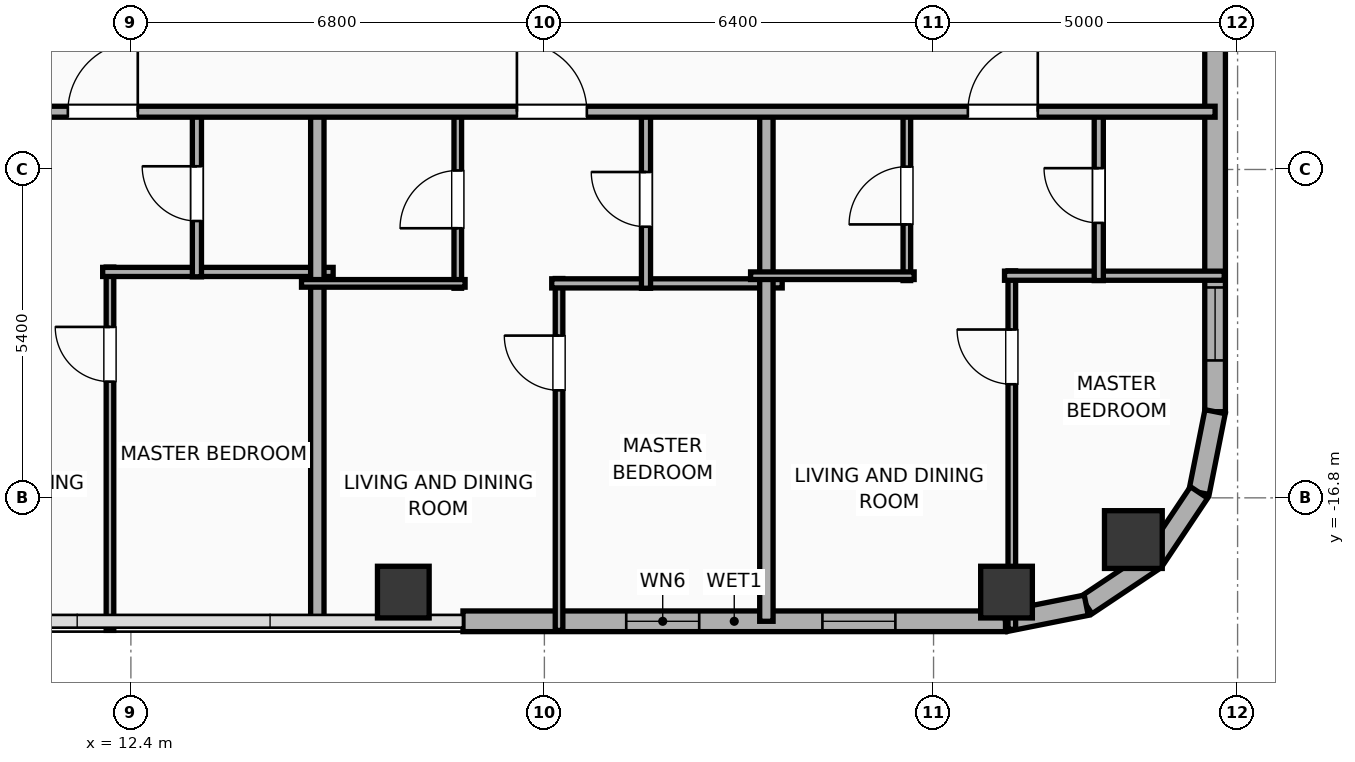
"""IFC4 building model, lengths in metres.
Left out: names, types, materials, properties, quantities, classifications, styles, units other than length and angle.
Written with IfcOpenShell. Run it as: python <this file> out.ifc"""

import sys

from ifc_helpers import new_model, si_unit, direction, frame, frame_2d, origin, origin_2d, place, context, subcontext, project, spatial, rectangle, hollow_rectangle, hollow_circle, extrude, element, fill, save


model = new_model("IFC4")
c1 = context("Model", 3, precision=1e-05, world=origin(), true_north=direction((0.0, 1.0)))
c2 = subcontext(c1, "Body", "Model", "MODEL_VIEW")
j1 = project(units=[si_unit("LENGTHUNIT", "METRE"), si_unit("PLANEANGLEUNIT", "RADIAN")], contexts=[c1])
p1 = place(None, origin())
s1 = spatial("IfcSite", under=j1, at=p1, CompositionType="ELEMENT")
p2 = place(p1, origin())
s2 = spatial("IfcBuilding", under=s1, at=p2, CompositionType="ELEMENT")
p3 = place(p2, frame((0.0, 0.0, 204.1)))
s3 = spatial("IfcBuildingStorey", under=s2, at=p3, CompositionType="ELEMENT", Elevation=204.1)
for number, where, z_axis, x_axis in (
    (1, (16.88, -18.35, 0.0), (0.0, 0.0, 1.0), (1.0, 0.0, 0.0)),
    (2, (26.8, -18.35, 0.0), (0.0, 0.0, 1.0), (1.0, 0.0, 0.0)),
):
    element("IfcColumn", number, at=place(p3, frame(where, z_axis=z_axis, x_axis=x_axis)), inside=s3, PredefinedType="COLUMN", context=c2, shape_type="SweptSolid", body=[
        extrude(hollow_rectangle(XDim=0.85, YDim=0.85, WallThickness=0.028, at=origin_2d()), origin(), (0.0, 0.0, 1.0), 3.9),
    ])
p4 = place(p3, frame((28.886, -17.486, 0.0), z_axis=(0.0, 0.0, 1.0), x_axis=(1.0, 0.0, 0.0)))
e3 = element("IfcColumn", 3, at=p4, inside=s3, PredefinedType="COLUMN", context=c2, shape_type="SweptSolid", body=[
    extrude(hollow_circle(Radius=0.475, WallThickness=0.032, at=origin_2d()), origin(), (0.0, 0.0, 1.0), 3.9),
])
p5 = place(p3, frame((26.783, -18.83, 0.0), z_axis=(0.0, 0.0, 1.0), x_axis=(-1.0, 0.0, 0.0)))
e4 = element("IfcWall", 4, at=p5, inside=s3, PredefinedType="ELEMENTEDWALL", context=c2, shape_type="SweptSolid", body=[
    extrude(rectangle(XDim=8.922, YDim=0.34, at=frame_2d((4.461, 0.0))), origin(), (0.0, 0.0, 1.0), 3.65),
])
p6 = place(p5, frame((5.037, 0.0, 0.75)))
e5 = element("IfcOpeningElement", 5, at=p6, cuts=e4, PredefinedType="OPENING", context=c2, shape_type="SweptSolid", body=[
    extrude(rectangle(XDim=1.2, YDim=2.05, at=frame_2d((0.6, 1.025))), frame((0.0, 0.18, 0.0), z_axis=(0.0, -1.0, 0.0), x_axis=(1.0, 0.0, 0.0)), (0.0, 0.0, 1.0), 0.36),
])
p7 = place(p5, frame((1.811, 0.0, 0.75)))
e6 = element("IfcOpeningElement", 6, at=p7, cuts=e4, PredefinedType="OPENING", context=c2, shape_type="SweptSolid", body=[
    extrude(rectangle(XDim=1.2, YDim=2.05, at=frame_2d((0.6, 1.025))), frame((0.0, 0.18, 0.0), z_axis=(0.0, -1.0, 0.0), x_axis=(1.0, 0.0, 0.0)), (0.0, 0.0, 1.0), 0.36),
])
p8 = place(p3, frame((30.23, 16.583, 0.0), z_axis=(0.0, 0.0, 1.0), x_axis=(0.0, -1.0, 0.0)))
e7 = element("IfcWall", 7, at=p8, inside=s3, PredefinedType="ELEMENTEDWALL", context=c2, shape_type="SweptSolid", body=[
    extrude(rectangle(XDim=31.967, YDim=0.34, at=frame_2d((15.983, 0.0))), origin(), (0.0, 0.0, 1.0), 3.65),
])
p9 = place(p8, frame((29.924, 0.0, 0.75)))
e8 = element("IfcOpeningElement", 8, at=p9, cuts=e7, PredefinedType="OPENING", context=c2, shape_type="SweptSolid", body=[
    extrude(rectangle(XDim=1.2, YDim=2.05, at=frame_2d((0.6, 1.025))), frame((0.0, 0.18, 0.0), z_axis=(0.0, -1.0, 0.0), x_axis=(1.0, 0.0, 0.0)), (0.0, 0.0, 1.0), 0.36),
])
p10 = place(p8, frame((11.463, 0.0, 0.75)))
e9 = element("IfcOpeningElement", 9, at=p10, cuts=e7, PredefinedType="OPENING", context=c2, shape_type="SweptSolid", body=[
    extrude(rectangle(XDim=1.2, YDim=2.05, at=frame_2d((0.6, 1.025))), frame((0.0, 0.18, 0.0), z_axis=(0.0, -1.0, 0.0), x_axis=(1.0, 0.0, 0.0)), (0.0, 0.0, 1.0), 0.36),
])
p11 = place(p8, frame((20.363, 0.0, 0.75)))
e10 = element("IfcOpeningElement", 10, at=p11, cuts=e7, PredefinedType="OPENING", context=c2, shape_type="SweptSolid", body=[
    extrude(rectangle(XDim=1.2, YDim=2.05, at=frame_2d((0.6, 1.025))), frame((0.0, 0.18, 0.0), z_axis=(0.0, -1.0, 0.0), x_axis=(1.0, 0.0, 0.0)), (0.0, 0.0, 1.0), 0.36),
])
p12 = place(p3, frame((30.23, -15.383, 0.0), z_axis=(0.0, 0.0, 1.0), x_axis=(-0.195110379894, -0.98078129043, 0.0)))
e11 = element("IfcWall", 11, at=p12, inside=s3, PredefinedType="ELEMENTEDWALL", context=c2, shape_type="SweptSolid", body=[
    extrude(rectangle(XDim=1.354, YDim=0.34, at=frame_2d((0.677, 0.0))), origin(), (0.0, 0.0, 1.0), 3.65),
])
p13 = place(p3, frame((29.966, -16.711, 0.0), z_axis=(0.0, 0.0, 1.0), x_axis=(-0.555584683399, -0.831459956686, 0.0)))
e12 = element("IfcWall", 12, at=p13, inside=s3, PredefinedType="ELEMENTEDWALL", context=c2, shape_type="SweptSolid", body=[
    extrude(rectangle(XDim=1.337, YDim=0.34, at=frame_2d((0.668, 0.0))), origin(), (0.0, 0.0, 1.0), 3.65),
])
p14 = place(p3, frame((29.223, -17.823, 0.0), z_axis=(0.0, 0.0, 1.0), x_axis=(-0.831403586725, -0.555669034571, 0.0)))
e13 = element("IfcWall", 13, at=p14, inside=s3, PredefinedType="ELEMENTEDWALL", context=c2, shape_type="SweptSolid", body=[
    extrude(rectangle(XDim=1.337, YDim=0.34, at=frame_2d((0.668, 0.0))), origin(), (0.0, 0.0, 1.0), 3.65),
])
p15 = place(p3, frame((28.111, -18.566, 0.0), z_axis=(0.0, 0.0, 1.0), x_axis=(-0.980788153188, -0.195075878998, 0.0)))
e14 = element("IfcWall", 14, at=p15, inside=s3, PredefinedType="ELEMENTEDWALL", context=c2, shape_type="SweptSolid", body=[
    extrude(rectangle(XDim=1.354, YDim=0.34, at=frame_2d((0.677, 0.0))), origin(), (0.0, 0.0, 1.0), 3.65),
])
p16 = place(p3, frame((12.056, -18.98, 0.0), z_axis=(0.0, 0.0, 1.0), x_axis=(0.0, 1.0, 0.0)))
e15 = element("IfcWall", 15, at=p16, inside=s3, PredefinedType="PARTITIONING", context=c2, shape_type="SweptSolid", body=[
    extrude(rectangle(XDim=5.975, YDim=0.125, at=frame_2d((2.988, 0.0))), origin(), (0.0, 0.0, 1.0), 3.65),
])
p17 = place(p16, frame((4.091, 0.0, 0.0)))
e16 = element("IfcOpeningElement", 16, at=p17, cuts=e15, PredefinedType="OPENING", context=c2, shape_type="SweptSolid", body=[
    extrude(rectangle(XDim=0.9, YDim=2.05, at=frame_2d((0.45, 1.025))), frame((0.0, 0.073, 0.0), z_axis=(0.0, -1.0, 0.0), x_axis=(1.0, 0.0, 0.0)), (0.0, 0.0, 1.0), 0.145),
])
p18 = place(p3, frame((11.936, -13.085, 0.0), z_axis=(0.0, 0.0, 1.0), x_axis=(1.0, 0.0, 0.0)))
e17 = element("IfcWall", 17, at=p18, inside=s3, PredefinedType="PLUMBINGWALL", context=c2, shape_type="SweptSolid", body=[
    extrude(rectangle(XDim=3.79, YDim=0.15, at=frame_2d((1.895, 0.0))), origin(), (0.0, 0.0, 1.0), 3.65),
])
p19 = place(p3, frame((13.486, -13.165, 0.0), z_axis=(0.0, 0.0, 1.0), x_axis=(0.0, 1.0, 0.0)))
e18 = element("IfcWall", 18, at=p19, inside=s3, PredefinedType="PLUMBINGWALL", context=c2, shape_type="SweptSolid", body=[
    extrude(rectangle(XDim=2.735, YDim=0.15, at=frame_2d((1.368, 0.0))), origin(), (0.0, 0.0, 1.0), 3.65),
])
p20 = place(p19, frame((0.917, 0.0, 0.0)))
e19 = element("IfcOpeningElement", 19, at=p20, cuts=e18, PredefinedType="OPENING", context=c2, shape_type="SweptSolid", body=[
    extrude(rectangle(XDim=0.9, YDim=2.05, at=frame_2d((0.45, 1.025))), frame((0.0, 0.085, 0.0), z_axis=(0.0, -1.0, 0.0), x_axis=(1.0, 0.0, 0.0)), (0.0, 0.0, 1.0), 0.17),
])
p21 = place(p3, frame((15.466, -18.83, 0.0), z_axis=(0.0, 0.0, 1.0), x_axis=(0.0, 1.0, 0.0)))
e20 = element("IfcWall", 20, at=p21, inside=s3, PredefinedType="PARTITIONING", context=c2, shape_type="SweptSolid", body=[
    extrude(rectangle(XDim=8.46, YDim=0.22, at=frame_2d((4.23, 0.0))), origin(), (0.0, 0.0, 1.0), 3.65),
])
p22 = place(p3, frame((19.441, -18.98, 0.0), z_axis=(0.0, 0.0, 1.0), x_axis=(0.0, 1.0, 0.0)))
e21 = element("IfcWall", 21, at=p22, inside=s3, PredefinedType="PARTITIONING", context=c2, shape_type="SweptSolid", body=[
    extrude(rectangle(XDim=5.787, YDim=0.125, at=frame_2d((2.894, 0.0))), origin(), (0.0, 0.0, 1.0), 3.65),
])
p23 = place(p22, frame((3.948, 0.0, 0.0)))
e22 = element("IfcOpeningElement", 22, at=p23, cuts=e21, PredefinedType="OPENING", context=c2, shape_type="SweptSolid", body=[
    extrude(rectangle(XDim=0.9, YDim=2.05, at=frame_2d((0.45, 1.025))), frame((0.0, 0.073, 0.0), z_axis=(0.0, -1.0, 0.0), x_axis=(1.0, 0.0, 0.0)), (0.0, 0.0, 1.0), 0.145),
])
p24 = place(p3, frame((19.321, -13.273, 0.0), z_axis=(0.0, 0.0, 1.0), x_axis=(1.0, 0.0, 0.0)))
e23 = element("IfcWall", 23, at=p24, inside=s3, PredefinedType="PLUMBINGWALL", context=c2, shape_type="SweptSolid", body=[
    extrude(rectangle(XDim=3.79, YDim=0.15, at=frame_2d((1.895, 0.0))), origin(), (0.0, 0.0, 1.0), 3.65),
])
p25 = place(p3, frame((17.776, -13.353, 0.0), z_axis=(0.0, 0.0, 1.0), x_axis=(0.0, 1.0, 0.0)))
e24 = element("IfcWall", 24, at=p25, inside=s3, PredefinedType="PARTITIONING", context=c2, shape_type="SweptSolid", body=[
    extrude(rectangle(XDim=2.923, YDim=0.125, at=frame_2d((1.461, 0.0))), origin(), (0.0, 0.0, 1.0), 3.65),
])
p26 = place(p25, frame((0.987, 0.0, 0.0)))
e25 = element("IfcOpeningElement", 25, at=p26, cuts=e24, PredefinedType="OPENING", context=c2, shape_type="SweptSolid", body=[
    extrude(rectangle(XDim=0.95, YDim=2.05, at=frame_2d((0.475, 1.025))), frame((0.0, 0.073, 0.0), z_axis=(0.0, -1.0, 0.0), x_axis=(1.0, 0.0, 0.0)), (0.0, 0.0, 1.0), 0.145),
])
p27 = place(p3, frame((15.206, -13.273, 0.0), z_axis=(0.0, 0.0, 1.0), x_axis=(1.0, 0.0, 0.0)))
e26 = element("IfcWall", 26, at=p27, inside=s3, PredefinedType="PARTITIONING", context=c2, shape_type="SweptSolid", body=[
    extrude(rectangle(XDim=2.69, YDim=0.125, at=frame_2d((1.345, 0.0))), origin(), (0.0, 0.0, 1.0), 3.65),
])
p28 = place(p3, frame((20.871, -13.353, 0.0), z_axis=(0.0, 0.0, 1.0), x_axis=(0.0, 1.0, 0.0)))
e27 = element("IfcWall", 27, at=p28, inside=s3, PredefinedType="PLUMBINGWALL", context=c2, shape_type="SweptSolid", body=[
    extrude(rectangle(XDim=2.923, YDim=0.15, at=frame_2d((1.461, 0.0))), origin(), (0.0, 0.0, 1.0), 3.65),
])
p29 = place(p28, frame((1.011, 0.0, 0.0)))
e28 = element("IfcOpeningElement", 28, at=p29, cuts=e27, PredefinedType="OPENING", context=c2, shape_type="SweptSolid", body=[
    extrude(rectangle(XDim=0.9, YDim=2.05, at=frame_2d((0.45, 1.025))), frame((0.0, 0.085, 0.0), z_axis=(0.0, -1.0, 0.0), x_axis=(1.0, 0.0, 0.0)), (0.0, 0.0, 1.0), 0.17),
])
p30 = place(p3, frame((22.851, -18.83, 0.0), z_axis=(0.0, 0.0, 1.0), x_axis=(0.0, 1.0, 0.0)))
e29 = element("IfcWall", 29, at=p30, inside=s3, PredefinedType="PARTITIONING", context=c2, shape_type="SweptSolid", body=[
    extrude(rectangle(XDim=8.46, YDim=0.22, at=frame_2d((4.23, 0.0))), origin(), (0.0, 0.0, 1.0), 3.65),
])
p31 = place(p3, frame((26.887, -18.962, 0.0), z_axis=(0.0, 0.0, 1.0), x_axis=(0.0, 1.0, 0.0)))
e30 = element("IfcWall", 30, at=p31, inside=s3, PredefinedType="PARTITIONING", context=c2, shape_type="SweptSolid", body=[
    extrude(rectangle(XDim=5.896, YDim=0.125, at=frame_2d((2.948, 0.0))), origin(), (0.0, 0.0, 1.0), 3.65),
])
p32 = place(p31, frame((4.031, 0.0, 0.0)))
e31 = element("IfcOpeningElement", 31, at=p32, cuts=e30, PredefinedType="OPENING", context=c2, shape_type="SweptSolid", body=[
    extrude(rectangle(XDim=0.9, YDim=2.05, at=frame_2d((0.45, 1.025))), frame((0.0, 0.073, 0.0), z_axis=(0.0, -1.0, 0.0), x_axis=(1.0, 0.0, 0.0)), (0.0, 0.0, 1.0), 0.145),
])
p33 = place(p3, frame((26.767, -13.147, 0.0), z_axis=(0.0, 0.0, 1.0), x_axis=(1.0, 0.0, 0.0)))
e32 = element("IfcWall", 32, at=p33, inside=s3, PredefinedType="PLUMBINGWALL", context=c2, shape_type="SweptSolid", body=[
    extrude(rectangle(XDim=3.613, YDim=0.15, at=frame_2d((1.806, 0.0))), origin(), (0.0, 0.0, 1.0), 3.65),
])
p34 = place(p3, frame((25.161, -13.227, 0.0), z_axis=(0.0, 0.0, 1.0), x_axis=(0.0, 1.0, 0.0)))
e33 = element("IfcWall", 33, at=p34, inside=s3, PredefinedType="PARTITIONING", context=c2, shape_type="SweptSolid", body=[
    extrude(rectangle(XDim=2.797, YDim=0.125, at=frame_2d((1.398, 0.0))), origin(), (0.0, 0.0, 1.0), 3.65),
])
p35 = place(p34, frame((0.924, 0.0, 0.0)))
e34 = element("IfcOpeningElement", 34, at=p35, cuts=e33, PredefinedType="OPENING", context=c2, shape_type="SweptSolid", body=[
    extrude(rectangle(XDim=0.95, YDim=2.05, at=frame_2d((0.475, 1.025))), frame((0.0, 0.073, 0.0), z_axis=(0.0, -1.0, 0.0), x_axis=(1.0, 0.0, 0.0)), (0.0, 0.0, 1.0), 0.145),
])
p36 = place(p3, frame((22.591, -13.147, 0.0), z_axis=(0.0, 0.0, 1.0), x_axis=(1.0, 0.0, 0.0)))
e35 = element("IfcWall", 35, at=p36, inside=s3, PredefinedType="PARTITIONING", context=c2, shape_type="SweptSolid", body=[
    extrude(rectangle(XDim=2.69, YDim=0.125, at=frame_2d((1.345, 0.0))), origin(), (0.0, 0.0, 1.0), 3.65),
])
p37 = place(p3, frame((28.317, -13.227, 0.0), z_axis=(0.0, 0.0, 1.0), x_axis=(0.0, 1.0, 0.0)))
e36 = element("IfcWall", 36, at=p37, inside=s3, PredefinedType="PLUMBINGWALL", context=c2, shape_type="SweptSolid", body=[
    extrude(rectangle(XDim=2.797, YDim=0.15, at=frame_2d((1.398, 0.0))), origin(), (0.0, 0.0, 1.0), 3.65),
])
p38 = place(p37, frame((0.948, 0.0, 0.0)))
e37 = element("IfcOpeningElement", 37, at=p38, cuts=e36, PredefinedType="OPENING", context=c2, shape_type="SweptSolid", body=[
    extrude(rectangle(XDim=0.9, YDim=2.05, at=frame_2d((0.45, 1.025))), frame((0.0, 0.085, 0.0), z_axis=(0.0, -1.0, 0.0), x_axis=(1.0, 0.0, 0.0)), (0.0, 0.0, 1.0), 0.17),
])
p39 = place(p3, frame((8.08, -10.45, 0.0), z_axis=(0.0, 0.0, 1.0), x_axis=(1.0, 0.0, 0.0)))
e38 = element("IfcWall", 38, at=p39, inside=s3, PredefinedType="PARTITIONING", context=c2, shape_type="SweptSolid", body=[
    extrude(rectangle(XDim=22.15, YDim=0.18, at=frame_2d((11.075, 0.0))), origin(), (0.0, 0.0, 1.0), 3.65),
])
p40 = place(p39, frame((3.283, 0.0, 0.0)))
e39 = element("IfcOpeningElement", 39, at=p40, cuts=e38, PredefinedType="OPENING", context=c2, shape_type="SweptSolid", body=[
    extrude(rectangle(XDim=1.15, YDim=2.05, at=frame_2d((0.575, 1.025))), frame((0.0, 0.1, 0.0), z_axis=(0.0, -1.0, 0.0), x_axis=(1.0, 0.0, 0.0)), (0.0, 0.0, 1.0), 0.2),
])
p41 = place(p39, frame((10.668, 0.0, 0.0)))
e40 = element("IfcOpeningElement", 40, at=p41, cuts=e38, PredefinedType="OPENING", context=c2, shape_type="SweptSolid", body=[
    extrude(rectangle(XDim=1.15, YDim=2.05, at=frame_2d((0.575, 1.025))), frame((0.0, 0.1, 0.0), z_axis=(0.0, -1.0, 0.0), x_axis=(1.0, 0.0, 0.0)), (0.0, 0.0, 1.0), 0.2),
])
p42 = place(p39, frame((18.084, 0.0, 0.0)))
e41 = element("IfcOpeningElement", 41, at=p42, cuts=e38, PredefinedType="OPENING", context=c2, shape_type="SweptSolid", body=[
    extrude(rectangle(XDim=1.15, YDim=2.05, at=frame_2d((0.575, 1.025))), frame((0.0, 0.1, 0.0), z_axis=(0.0, -1.0, 0.0), x_axis=(1.0, 0.0, 0.0)), (0.0, 0.0, 1.0), 0.2),
])
p43 = place(p6, origin())
e42 = element("IfcWindow", 42, at=p43, inside=s3, PartitioningType="SINGLE_PANEL", PredefinedType="WINDOW", context=c2, shape_type="SweptSolid", body=[
    extrude(rectangle(XDim=1.2, YDim=2.05, at=frame_2d((0.6, 1.025))), frame((0.0, 0.03, 0.0), z_axis=(0.0, -1.0, 0.0), x_axis=(1.0, 0.0, 0.0)), (0.0, 0.0, 1.0), 0.06),
])
fill(e5, e42)
p44 = place(p7, origin())
e43 = element("IfcWindow", 43, at=p44, inside=s3, PartitioningType="SINGLE_PANEL", PredefinedType="WINDOW", context=c2, shape_type="SweptSolid", body=[
    extrude(rectangle(XDim=1.2, YDim=2.05, at=frame_2d((0.6, 1.025))), frame((0.0, 0.03, 0.0), z_axis=(0.0, -1.0, 0.0), x_axis=(1.0, 0.0, 0.0)), (0.0, 0.0, 1.0), 0.06),
])
fill(e6, e43)
p45 = place(p9, origin())
e44 = element("IfcWindow", 44, at=p45, inside=s3, PartitioningType="SINGLE_PANEL", PredefinedType="WINDOW", context=c2, shape_type="SweptSolid", body=[
    extrude(rectangle(XDim=1.2, YDim=2.05, at=frame_2d((0.6, 1.025))), frame((0.0, 0.03, 0.0), z_axis=(0.0, -1.0, 0.0), x_axis=(1.0, 0.0, 0.0)), (0.0, 0.0, 1.0), 0.06),
])
fill(e8, e44)
p46 = place(p17, origin())
e45 = element("IfcDoor", 45, at=p46, inside=s3, OperationType="SINGLE_SWING_RIGHT", PredefinedType="DOOR", context=c2, shape_type="SweptSolid", body=[
    extrude(rectangle(XDim=0.9, YDim=2.05, at=frame_2d((0.45, 1.025))), frame((0.0, 0.025, 0.0), z_axis=(0.0, -1.0, 0.0), x_axis=(1.0, 0.0, 0.0)), (0.0, 0.0, 1.0), 0.05),
])
fill(e16, e45)
p47 = place(p20, origin())
e46 = element("IfcDoor", 46, at=p47, inside=s3, OperationType="SINGLE_SWING_RIGHT", PredefinedType="DOOR", context=c2, shape_type="SweptSolid", body=[
    extrude(rectangle(XDim=0.9, YDim=2.05, at=frame_2d((0.45, 1.025))), frame((0.0, 0.025, 0.0), z_axis=(0.0, -1.0, 0.0), x_axis=(1.0, 0.0, 0.0)), (0.0, 0.0, 1.0), 0.05),
])
fill(e19, e46)
p48 = place(p23, origin())
e47 = element("IfcDoor", 47, at=p48, inside=s3, OperationType="SINGLE_SWING_RIGHT", PredefinedType="DOOR", context=c2, shape_type="SweptSolid", body=[
    extrude(rectangle(XDim=0.9, YDim=2.05, at=frame_2d((0.45, 1.025))), frame((0.0, 0.025, 0.0), z_axis=(0.0, -1.0, 0.0), x_axis=(1.0, 0.0, 0.0)), (0.0, 0.0, 1.0), 0.05),
])
fill(e22, e47)
p49 = place(p26, origin())
e48 = element("IfcDoor", 48, at=p49, inside=s3, OperationType="SINGLE_SWING_LEFT", PredefinedType="DOOR", context=c2, shape_type="SweptSolid", body=[
    extrude(rectangle(XDim=0.95, YDim=2.05, at=frame_2d((0.475, 1.025))), frame((0.0, 0.025, 0.0), z_axis=(0.0, -1.0, 0.0), x_axis=(1.0, 0.0, 0.0)), (0.0, 0.0, 1.0), 0.05),
])
fill(e25, e48)
p50 = place(p29, origin())
e49 = element("IfcDoor", 49, at=p50, inside=s3, OperationType="SINGLE_SWING_RIGHT", PredefinedType="DOOR", context=c2, shape_type="SweptSolid", body=[
    extrude(rectangle(XDim=0.9, YDim=2.05, at=frame_2d((0.45, 1.025))), frame((0.0, 0.025, 0.0), z_axis=(0.0, -1.0, 0.0), x_axis=(1.0, 0.0, 0.0)), (0.0, 0.0, 1.0), 0.05),
])
fill(e28, e49)
p51 = place(p32, origin())
e50 = element("IfcDoor", 50, at=p51, inside=s3, OperationType="SINGLE_SWING_RIGHT", PredefinedType="DOOR", context=c2, shape_type="SweptSolid", body=[
    extrude(rectangle(XDim=0.9, YDim=2.05, at=frame_2d((0.45, 1.025))), frame((0.0, 0.025, 0.0), z_axis=(0.0, -1.0, 0.0), x_axis=(1.0, 0.0, 0.0)), (0.0, 0.0, 1.0), 0.05),
])
fill(e31, e50)
p52 = place(p35, origin())
e51 = element("IfcDoor", 51, at=p52, inside=s3, OperationType="SINGLE_SWING_LEFT", PredefinedType="DOOR", context=c2, shape_type="SweptSolid", body=[
    extrude(rectangle(XDim=0.95, YDim=2.05, at=frame_2d((0.475, 1.025))), frame((0.0, 0.025, 0.0), z_axis=(0.0, -1.0, 0.0), x_axis=(1.0, 0.0, 0.0)), (0.0, 0.0, 1.0), 0.05),
])
fill(e34, e51)
p53 = place(p38, origin())
e52 = element("IfcDoor", 52, at=p53, inside=s3, OperationType="SINGLE_SWING_RIGHT", PredefinedType="DOOR", context=c2, shape_type="SweptSolid", body=[
    extrude(rectangle(XDim=0.9, YDim=2.05, at=frame_2d((0.45, 1.025))), frame((0.0, 0.025, 0.0), z_axis=(0.0, -1.0, 0.0), x_axis=(1.0, 0.0, 0.0)), (0.0, 0.0, 1.0), 0.05),
])
fill(e37, e52)
p54 = place(p40, origin())
e53 = element("IfcDoor", 53, at=p54, inside=s3, OperationType="SINGLE_SWING_RIGHT", PredefinedType="DOOR", context=c2, shape_type="SweptSolid", body=[
    extrude(rectangle(XDim=1.15, YDim=2.05, at=frame_2d((0.575, 1.025))), frame((0.0, 0.025, 0.0), z_axis=(0.0, -1.0, 0.0), x_axis=(1.0, 0.0, 0.0)), (0.0, 0.0, 1.0), 0.05),
])
fill(e39, e53)
p55 = place(p41, origin())
e54 = element("IfcDoor", 54, at=p55, inside=s3, OperationType="SINGLE_SWING_LEFT", PredefinedType="DOOR", context=c2, shape_type="SweptSolid", body=[
    extrude(rectangle(XDim=1.15, YDim=2.05, at=frame_2d((0.575, 1.025))), frame((0.0, 0.025, 0.0), z_axis=(0.0, -1.0, 0.0), x_axis=(1.0, 0.0, 0.0)), (0.0, 0.0, 1.0), 0.05),
])
fill(e40, e54)
p56 = place(p42, origin())
e55 = element("IfcDoor", 55, at=p56, inside=s3, OperationType="SINGLE_SWING_RIGHT", PredefinedType="DOOR", context=c2, shape_type="SweptSolid", body=[
    extrude(rectangle(XDim=1.15, YDim=2.05, at=frame_2d((0.575, 1.025))), frame((0.0, 0.025, 0.0), z_axis=(0.0, -1.0, 0.0), x_axis=(1.0, 0.0, 0.0)), (0.0, 0.0, 1.0), 0.05),
])
fill(e41, e55)
save(model, sys.argv[1])
